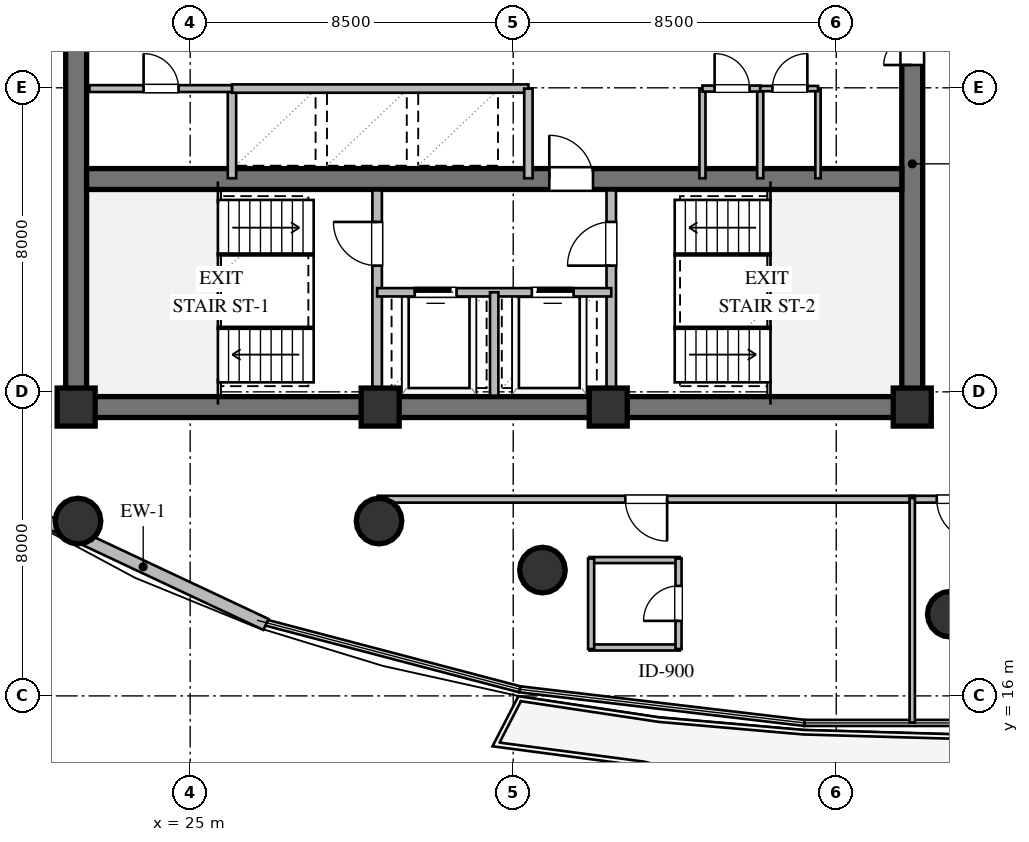
"""IFC4 building model, lengths in metres.
Left out: names, types, materials, properties, quantities, classifications, styles, units other than length and angle.
Written with IfcOpenShell. Run it as: python <this file> out.ifc"""

import sys

from ifc_helpers import new_model, si_unit, direction, frame, frame_2d, origin, origin_2d, place, context, subcontext, project, spatial, rectangle, circle, extrude, element, fill, save


model = new_model("IFC4")
c1 = context("Model", 3, precision=1e-05, world=origin(), true_north=direction((0.0, 1.0)))
c2 = subcontext(c1, "Body", "Model", "MODEL_VIEW")
j1 = project(units=[si_unit("LENGTHUNIT", "METRE"), si_unit("PLANEANGLEUNIT", "RADIAN")], contexts=[c1])
p1 = place(None, origin())
s1 = spatial("IfcSite", under=j1, at=p1, CompositionType="ELEMENT")
p2 = place(p1, origin())
s2 = spatial("IfcBuilding", under=s1, at=p2, CompositionType="ELEMENT")
p3 = place(p2, frame((0.0, 0.0, 160.2)))
s3 = spatial("IfcBuildingStorey", under=s2, at=p3, CompositionType="ELEMENT", Elevation=160.2)
p4 = place(p3, frame((21.725, 23.6, 0.0), z_axis=(0.0, 0.0, 1.0), x_axis=(1.0, 0.0, 0.0)))
e1 = element("IfcWall", 1, at=p4, inside=s3, PredefinedType="SHEAR", context=c2, shape_type="SweptSolid", body=[
    extrude(rectangle(XDim=22.55, YDim=0.55, at=frame_2d((11.275, 0.0))), origin(), (0.0, 0.0, 1.0), 3.36),
])
p5 = place(p3, frame((22.0, 23.875, 0.0), z_axis=(0.0, 0.0, 1.0), x_axis=(0.0, 1.0, 0.0)))
e2 = element("IfcWall", 2, at=p5, inside=s3, PredefinedType="SHEAR", context=c2, shape_type="SweptSolid", body=[
    extrude(rectangle(XDim=12.25, YDim=0.55, at=frame_2d((6.125, 0.0))), origin(), (0.0, 0.0, 1.0), 3.36),
])
p6 = place(p3, frame((44.0, 23.875, 0.0), z_axis=(0.0, 0.0, 1.0), x_axis=(0.0, 1.0, 0.0)))
e3 = element("IfcWall", 3, at=p6, inside=s3, PredefinedType="SHEAR", context=c2, shape_type="SweptSolid", body=[
    extrude(rectangle(XDim=12.25, YDim=0.55, at=frame_2d((6.125, 0.0))), origin(), (0.0, 0.0, 1.0), 3.36),
])
p7 = place(p6, frame((8.725, 0.0, 0.0)))
e4 = element("IfcOpeningElement", 4, at=p7, cuts=e3, PredefinedType="OPENING", context=c2, shape_type="SweptSolid", body=[
    extrude(rectangle(XDim=1.5, YDim=2.15, at=frame_2d((0.75, 1.075))), frame((0.0, 0.285, 0.0), z_axis=(0.0, -1.0, 0.0), x_axis=(1.0, 0.0, 0.0)), (0.0, 0.0, 1.0), 0.57),
])
p8 = place(p3, frame((22.275, 29.6, 0.0), z_axis=(0.0, 0.0, 1.0), x_axis=(1.0, 0.0, 0.0)))
e5 = element("IfcWall", 5, at=p8, inside=s3, PredefinedType="SHEAR", context=c2, shape_type="SweptSolid", body=[
    extrude(rectangle(XDim=21.45, YDim=0.55, at=frame_2d((10.725, 0.0))), origin(), (0.0, 0.0, 1.0), 3.36),
])
p9 = place(p8, frame((12.175, 0.0, 0.0)))
e6 = element("IfcOpeningElement", 6, at=p9, cuts=e5, PredefinedType="OPENING", context=c2, shape_type="SweptSolid", body=[
    extrude(rectangle(XDim=1.15, YDim=2.1, at=frame_2d((0.575, 1.05))), frame((0.0, 0.285, 0.0), z_axis=(0.0, -1.0, 0.0), x_axis=(1.0, 0.0, 0.0)), (0.0, 0.0, 1.0), 0.57),
])
for number, where, z_axis, x_axis in (
    (7, (22.0, 23.6, 0.0), (0.0, 0.0, 1.0), (1.0, 0.0, 0.0)),
    (8, (30.0, 23.6, 0.0), (0.0, 0.0, 1.0), (1.0, 0.0, 0.0)),
    (9, (36.0, 23.6, 0.0), (0.0, 0.0, 1.0), (1.0, 0.0, 0.0)),
    (10, (44.0, 23.6, 0.0), (0.0, 0.0, 1.0), (1.0, 0.0, 0.0)),
):
    element("IfcColumn", number, at=place(p3, frame(where, z_axis=z_axis, x_axis=x_axis)), inside=s3, PredefinedType="COLUMN", context=c2, shape_type="SweptSolid", body=[
        extrude(rectangle(XDim=1.0, YDim=1.0, at=origin_2d()), origin(), (0.0, 0.0, 1.0), 3.6),
    ])
for number, where, z_axis, x_axis in (
    (11, (22.05, 20.6, 0.0), (0.0, 0.0, 1.0), (1.0, 0.0, 0.0)),
    (12, (29.97, 20.6, 0.0), (0.0, 0.0, 1.0), (1.0, 0.0, 0.0)),
    (13, (34.27, 19.31, 0.0), (0.0, 0.0, 1.0), (1.0, 0.0, 0.0)),
    (14, (45.0, 18.15, 0.0), (0.0, 0.0, 1.0), (1.0, 0.0, 0.0)),
):
    element("IfcColumn", number, at=place(p3, frame(where, z_axis=z_axis, x_axis=x_axis)), inside=s3, PredefinedType="COLUMN", context=c2, shape_type="SweptSolid", body=[
        extrude(circle(Radius=0.6, at=origin_2d()), origin(), (0.0, 0.0, 1.0), 3.6),
    ])
p10 = place(p3, frame((26.994, 17.88, 0.0), z_axis=(0.0, 0.0, 1.0), x_axis=(-0.905106920297, 0.425184034073, 0.0)))
e15 = element("IfcWall", 15, at=p10, inside=s3, PredefinedType="STANDARD", context=c2, shape_type="SweptSolid", body=[
    extrude(rectangle(XDim=7.136, YDim=0.32, at=frame_2d((3.568, 0.0))), origin(), (0.0, 0.0, 1.0), 2.657),
])
p11 = place(p3, frame((29.92, 23.9, 0.0), z_axis=(0.0, 0.0, 1.0), x_axis=(0.0, 1.0, 0.0)))
e16 = element("IfcWall", 16, at=p11, inside=s3, PredefinedType="SOLIDWALL", context=c2, shape_type="SweptSolid", body=[
    extrude(rectangle(XDim=5.4, YDim=0.25, at=frame_2d((2.7, 0.0))), origin(), (0.0, 0.0, 1.0), 2.806),
])
p12 = place(p11, frame((3.421, 0.0, 0.0)))
e17 = element("IfcOpeningElement", 17, at=p12, cuts=e16, PredefinedType="OPENING", context=c2, shape_type="SweptSolid", body=[
    extrude(rectangle(XDim=1.15, YDim=2.1, at=frame_2d((0.575, 1.05))), frame((0.0, 0.135, 0.0), z_axis=(0.0, -1.0, 0.0), x_axis=(1.0, 0.0, 0.0)), (0.0, 0.0, 1.0), 0.27),
])
p13 = place(p3, frame((36.08, 23.9, 0.0), z_axis=(0.0, 0.0, 1.0), x_axis=(0.0, 1.0, 0.0)))
e18 = element("IfcWall", 18, at=p13, inside=s3, PredefinedType="SOLIDWALL", context=c2, shape_type="SweptSolid", body=[
    extrude(rectangle(XDim=5.4, YDim=0.25, at=frame_2d((2.7, 0.0))), origin(), (0.0, 0.0, 1.0), 3.36),
])
p14 = place(p13, frame((3.421, 0.0, 0.0)))
e19 = element("IfcOpeningElement", 19, at=p14, cuts=e18, PredefinedType="OPENING", context=c2, shape_type="SweptSolid", body=[
    extrude(rectangle(XDim=1.15, YDim=2.1, at=frame_2d((0.575, 1.05))), frame((0.0, 0.135, 0.0), z_axis=(0.0, -1.0, 0.0), x_axis=(1.0, 0.0, 0.0)), (0.0, 0.0, 1.0), 0.27),
])
p15 = place(p3, frame((29.92, 26.62, 0.0), z_axis=(0.0, 0.0, 1.0), x_axis=(1.0, 0.0, 0.0)))
e20 = element("IfcWall", 20, at=p15, inside=s3, PredefinedType="SOLIDWALL", context=c2, shape_type="SweptSolid", body=[
    extrude(rectangle(XDim=6.16, YDim=0.22, at=frame_2d((3.08, 0.0))), origin(), (0.0, 0.0, 1.0), 3.36),
])
p16 = place(p15, frame((0.99, 0.0, 0.0)))
e21 = element("IfcOpeningElement", 21, at=p16, cuts=e20, PredefinedType="OPENING", context=c2, shape_type="SweptSolid", body=[
    extrude(rectangle(XDim=1.1, YDim=2.1, at=frame_2d((0.55, 1.05))), frame((0.0, 0.12, 0.0), z_axis=(0.0, -1.0, 0.0), x_axis=(1.0, 0.0, 0.0)), (0.0, 0.0, 1.0), 0.24),
])
p17 = place(p15, frame((4.07, 0.0, 0.0)))
e22 = element("IfcOpeningElement", 22, at=p17, cuts=e20, PredefinedType="OPENING", context=c2, shape_type="SweptSolid", body=[
    extrude(rectangle(XDim=1.1, YDim=2.1, at=frame_2d((0.55, 1.05))), frame((0.0, 0.12, 0.0), z_axis=(0.0, -1.0, 0.0), x_axis=(1.0, 0.0, 0.0)), (0.0, 0.0, 1.0), 0.24),
])
p18 = place(p3, frame((33.0, 23.9, 0.0), z_axis=(0.0, 0.0, 1.0), x_axis=(0.0, 1.0, 0.0)))
e23 = element("IfcWall", 23, at=p18, inside=s3, PredefinedType="SOLIDWALL", context=c2, shape_type="SweptSolid", body=[
    extrude(rectangle(XDim=2.72, YDim=0.22, at=frame_2d((1.36, 0.0))), origin(), (0.0, 0.0, 1.0), 3.36),
])
p19 = place(p3, frame((26.1, 29.62, 0.0), z_axis=(0.0, 0.0, 1.0), x_axis=(0.0, 1.0, 0.0)))
e24 = element("IfcWall", 24, at=p19, inside=s3, PredefinedType="SOLIDWALL", context=c2, shape_type="SweptSolid", body=[
    extrude(rectangle(XDim=2.36, YDim=0.22, at=frame_2d((1.18, 0.0))), origin(), (0.0, 0.0, 1.0), 3.36),
])
p20 = place(p3, frame((26.1, 31.98, 0.0), z_axis=(0.0, 0.0, 1.0), x_axis=(1.0, 0.0, 0.0)))
e25 = element("IfcWall", 25, at=p20, inside=s3, PredefinedType="SOLIDWALL", context=c2, shape_type="SweptSolid", body=[
    extrude(rectangle(XDim=7.8, YDim=0.22, at=frame_2d((3.9, 0.0))), origin(), (0.0, 0.0, 1.0), 3.36),
])
p21 = place(p3, frame((33.9, 29.62, 0.0), z_axis=(0.0, 0.0, 1.0), x_axis=(0.0, 1.0, 0.0)))
e26 = element("IfcWall", 26, at=p21, inside=s3, PredefinedType="SOLIDWALL", context=c2, shape_type="SweptSolid", body=[
    extrude(rectangle(XDim=2.36, YDim=0.22, at=frame_2d((1.18, 0.0))), origin(), (0.0, 0.0, 1.0), 3.36),
])
p22 = place(p3, frame((22.35, 31.98, 0.0), z_axis=(0.0, 0.0, 1.0), x_axis=(1.0, 0.0, 0.0)))
e27 = element("IfcWall", 27, at=p22, inside=s3, PredefinedType="PARTITIONING", context=c2, shape_type="SweptSolid", body=[
    extrude(rectangle(XDim=3.75, YDim=0.18, at=frame_2d((1.875, 0.0))), origin(), (0.0, 0.0, 1.0), 3.36),
])
p23 = place(p22, frame((1.425, 0.0, 0.0)))
e28 = element("IfcOpeningElement", 28, at=p23, cuts=e27, PredefinedType="OPENING", context=c2, shape_type="SweptSolid", body=[
    extrude(rectangle(XDim=0.92, YDim=2.1, at=frame_2d((0.46, 1.05))), frame((0.0, 0.1, 0.0), z_axis=(0.0, -1.0, 0.0), x_axis=(1.0, 0.0, 0.0)), (0.0, 0.0, 1.0), 0.2),
])
for number, where, z_axis, x_axis in (
    (29, (38.48, 29.62, 0.0), (0.0, 0.0, 1.0), (0.0, 1.0, 0.0)),
    (30, (40.0, 29.62, 0.0), (0.0, 0.0, 1.0), (0.0, 1.0, 0.0)),
):
    element("IfcWall", number, at=place(p3, frame(where, z_axis=z_axis, x_axis=x_axis)), inside=s3, PredefinedType="PLUMBINGWALL", context=c2, shape_type="SweptSolid", body=[
        extrude(rectangle(XDim=2.36, YDim=0.16, at=frame_2d((1.18, 0.0))), origin(), (0.0, 0.0, 1.0), 3.36),
    ])
p24 = place(p3, frame((41.52, 29.62, 0.0), z_axis=(0.0, 0.0, 1.0), x_axis=(0.0, 1.0, 0.0)))
e31 = element("IfcWall", 31, at=p24, inside=s3, PredefinedType="PARTITIONING", context=c2, shape_type="SweptSolid", body=[
    extrude(rectangle(XDim=2.36, YDim=0.14, at=frame_2d((1.18, 0.0))), origin(), (0.0, 0.0, 1.0), 3.36),
])
p25 = place(p3, frame((38.48, 31.98, 0.0), z_axis=(0.0, 0.0, 1.0), x_axis=(1.0, 0.0, 0.0)))
e32 = element("IfcWall", 32, at=p25, inside=s3, PredefinedType="PLUMBINGWALL", context=c2, shape_type="SweptSolid", body=[
    extrude(rectangle(XDim=1.52, YDim=0.16, at=frame_2d((0.76, 0.0))), origin(), (0.0, 0.0, 1.0), 3.36),
])
p26 = place(p25, frame((0.32, 0.0, 0.0)))
e33 = element("IfcOpeningElement", 33, at=p26, cuts=e32, PredefinedType="OPENING", context=c2, shape_type="SweptSolid", body=[
    extrude(rectangle(XDim=0.92, YDim=2.1, at=frame_2d((0.46, 1.05))), frame((0.0, 0.09, 0.0), z_axis=(0.0, -1.0, 0.0), x_axis=(1.0, 0.0, 0.0)), (0.0, 0.0, 1.0), 0.18),
])
p27 = place(p3, frame((40.0, 31.98, 0.0), z_axis=(0.0, 0.0, 1.0), x_axis=(1.0, 0.0, 0.0)))
e34 = element("IfcWall", 34, at=p27, inside=s3, PredefinedType="PARTITIONING", context=c2, shape_type="SweptSolid", body=[
    extrude(rectangle(XDim=1.52, YDim=0.14, at=frame_2d((0.76, 0.0))), origin(), (0.0, 0.0, 1.0), 3.36),
])
p28 = place(p27, frame((0.32, 0.0, 0.0)))
e35 = element("IfcOpeningElement", 35, at=p28, cuts=e34, PredefinedType="OPENING", context=c2, shape_type="SweptSolid", body=[
    extrude(rectangle(XDim=0.92, YDim=2.1, at=frame_2d((0.46, 1.05))), frame((0.0, 0.08, 0.0), z_axis=(0.0, -1.0, 0.0), x_axis=(1.0, 0.0, 0.0)), (0.0, 0.0, 1.0), 0.16),
])
p29 = place(p3, frame((35.51, 17.274, 0.0), z_axis=(0.0, 0.0, 1.0), x_axis=(1.0, 0.0, 0.0)))
e36 = element("IfcWall", 36, at=p29, inside=s3, PredefinedType="PLUMBINGWALL", context=c2, shape_type="SweptSolid", body=[
    extrude(rectangle(XDim=2.38, YDim=0.16, at=frame_2d((1.19, 0.0))), origin(), (0.0, 0.0, 1.0), 3.36),
])
p30 = place(p3, frame((35.51, 19.574, 0.0), z_axis=(0.0, 0.0, 1.0), x_axis=(1.0, 0.0, 0.0)))
e37 = element("IfcWall", 37, at=p30, inside=s3, PredefinedType="PLUMBINGWALL", context=c2, shape_type="SweptSolid", body=[
    extrude(rectangle(XDim=2.38, YDim=0.16, at=frame_2d((1.19, 0.0))), origin(), (0.0, 0.0, 1.0), 2.657),
])
p31 = place(p3, frame((35.55, 17.234, 0.0), z_axis=(0.0, 0.0, 1.0), x_axis=(0.0, 1.0, 0.0)))
e38 = element("IfcWall", 38, at=p31, inside=s3, PredefinedType="PLUMBINGWALL", context=c2, shape_type="SweptSolid", body=[
    extrude(rectangle(XDim=2.38, YDim=0.16, at=frame_2d((1.19, 0.0))), origin(), (0.0, 0.0, 1.0), 3.36),
])
p32 = place(p3, frame((37.85, 17.234, 0.0), z_axis=(0.0, 0.0, 1.0), x_axis=(0.0, 1.0, 0.0)))
e39 = element("IfcWall", 39, at=p32, inside=s3, PredefinedType="PLUMBINGWALL", context=c2, shape_type="SweptSolid", body=[
    extrude(rectangle(XDim=2.38, YDim=0.16, at=frame_2d((1.19, 0.0))), origin(), (0.0, 0.0, 1.0), 3.36),
])
p33 = place(p32, frame((0.74, 0.0, 0.0)))
e40 = element("IfcOpeningElement", 40, at=p33, cuts=e39, PredefinedType="OPENING", context=c2, shape_type="SweptSolid", body=[
    extrude(rectangle(XDim=0.92, YDim=2.1, at=frame_2d((0.46, 1.05))), frame((0.0, 0.09, 0.0), z_axis=(0.0, -1.0, 0.0), x_axis=(1.0, 0.0, 0.0)), (0.0, 0.0, 1.0), 0.18),
])
p34 = place(p3, frame((44.065, 21.175, 0.0), z_axis=(0.0, 0.0, 1.0), x_axis=(-1.0, 0.0, 0.0)))
e41 = element("IfcWall", 41, at=p34, inside=s3, PredefinedType="PARTITIONING", context=c2, shape_type="SweptSolid", body=[
    extrude(rectangle(XDim=14.13, YDim=0.18, at=frame_2d((7.065, 0.0))), origin(), (0.0, 0.0, 1.0), 2.657),
])
p35 = place(p34, frame((6.515, 0.0, 0.0)))
e42 = element("IfcOpeningElement", 42, at=p35, cuts=e41, PredefinedType="OPENING", context=c2, shape_type="SweptSolid", body=[
    extrude(rectangle(XDim=1.1, YDim=2.1, at=frame_2d((0.55, 1.05))), frame((0.0, 0.1, 0.0), z_axis=(0.0, -1.0, 0.0), x_axis=(1.0, 0.0, 0.0)), (0.0, 0.0, 1.0), 0.2),
])
p36 = place(p3, frame((46.455, 21.175, 0.0), z_axis=(0.0, 0.0, 1.0), x_axis=(-1.0, 0.0, 0.0)))
e43 = element("IfcWall", 43, at=p36, inside=s3, PredefinedType="PARTITIONING", context=c2, shape_type="SweptSolid", body=[
    extrude(rectangle(XDim=2.52, YDim=0.18, at=frame_2d((1.26, 0.0))), origin(), (0.0, 0.0, 1.0), 2.996),
])
p37 = place(p36, frame((0.71, 0.0, 0.0)))
e44 = element("IfcOpeningElement", 44, at=p37, cuts=e43, PredefinedType="OPENING", context=c2, shape_type="SweptSolid", body=[
    extrude(rectangle(XDim=1.1, YDim=2.1, at=frame_2d((0.55, 1.05))), frame((0.0, 0.1, 0.0), z_axis=(0.0, -1.0, 0.0), x_axis=(1.0, 0.0, 0.0)), (0.0, 0.0, 1.0), 0.2),
])
p38 = place(p3, frame((44.0, 21.205, 0.0), z_axis=(0.0, 0.0, 1.0), x_axis=(0.0, -1.0, 0.0)))
e45 = element("IfcWall", 45, at=p38, inside=s3, PredefinedType="PARTITIONING", context=c2, shape_type="SweptSolid", body=[
    extrude(rectangle(XDim=5.906, YDim=0.14, at=frame_2d((2.953, 0.0))), origin(), (0.0, 0.0, 1.0), 2.806),
])
p39 = place(p12, origin())
e46 = element("IfcDoor", 46, at=p39, inside=s3, OperationType="SINGLE_SWING_RIGHT", PredefinedType="DOOR", context=c2, shape_type="SweptSolid", body=[
    extrude(rectangle(XDim=1.15, YDim=2.1, at=frame_2d((0.575, 1.05))), frame((0.0, 0.025, 0.0), z_axis=(0.0, -1.0, 0.0), x_axis=(1.0, 0.0, 0.0)), (0.0, 0.0, 1.0), 0.05),
])
fill(e17, e46)
p40 = place(p14, origin())
e47 = element("IfcDoor", 47, at=p40, inside=s3, OperationType="SINGLE_SWING_LEFT", PredefinedType="DOOR", context=c2, shape_type="SweptSolid", body=[
    extrude(rectangle(XDim=1.15, YDim=2.1, at=frame_2d((0.575, 1.05))), frame((0.0, 0.025, 0.0), z_axis=(0.0, -1.0, 0.0), x_axis=(1.0, 0.0, 0.0)), (0.0, 0.0, 1.0), 0.05),
])
fill(e19, e47)
p41 = place(p16, origin())
e48 = element("IfcDoor", 48, at=p41, inside=s3, OperationType="SLIDING_TO_LEFT", PredefinedType="DOOR", context=c2, shape_type="SweptSolid", body=[
    extrude(rectangle(XDim=1.1, YDim=2.1, at=frame_2d((0.55, 1.05))), frame((0.0, 0.025, 0.0), z_axis=(0.0, -1.0, 0.0), x_axis=(1.0, 0.0, 0.0)), (0.0, 0.0, 1.0), 0.05),
])
fill(e21, e48)
p42 = place(p17, origin())
e49 = element("IfcDoor", 49, at=p42, inside=s3, OperationType="SLIDING_TO_RIGHT", PredefinedType="DOOR", context=c2, shape_type="SweptSolid", body=[
    extrude(rectangle(XDim=1.1, YDim=2.1, at=frame_2d((0.55, 1.05))), frame((0.0, 0.025, 0.0), z_axis=(0.0, -1.0, 0.0), x_axis=(1.0, 0.0, 0.0)), (0.0, 0.0, 1.0), 0.05),
])
fill(e22, e49)
p43 = place(p9, origin())
e50 = element("IfcDoor", 50, at=p43, inside=s3, OperationType="SINGLE_SWING_LEFT", PredefinedType="DOOR", context=c2, shape_type="SweptSolid", body=[
    extrude(rectangle(XDim=1.15, YDim=2.1, at=frame_2d((0.575, 1.05))), frame((0.0, 0.025, 0.0), z_axis=(0.0, -1.0, 0.0), x_axis=(1.0, 0.0, 0.0)), (0.0, 0.0, 1.0), 0.05),
])
fill(e6, e50)
p44 = place(p7, origin())
e51 = element("IfcDoor", 51, at=p44, inside=s3, OperationType="DOUBLE_DOOR_SINGLE_SWING", PredefinedType="DOOR", context=c2, shape_type="SweptSolid", body=[
    extrude(rectangle(XDim=1.5, YDim=2.15, at=frame_2d((0.75, 1.075))), frame((0.0, 0.025, 0.0), z_axis=(0.0, -1.0, 0.0), x_axis=(1.0, 0.0, 0.0)), (0.0, 0.0, 1.0), 0.05),
])
fill(e4, e51)
p45 = place(p23, origin())
e52 = element("IfcDoor", 52, at=p45, inside=s3, OperationType="SINGLE_SWING_LEFT", PredefinedType="DOOR", context=c2, shape_type="SweptSolid", body=[
    extrude(rectangle(XDim=0.92, YDim=2.1, at=frame_2d((0.46, 1.05))), frame((0.0, 0.025, 0.0), z_axis=(0.0, -1.0, 0.0), x_axis=(1.0, 0.0, 0.0)), (0.0, 0.0, 1.0), 0.05),
])
fill(e28, e52)
p46 = place(p26, origin())
e53 = element("IfcDoor", 53, at=p46, inside=s3, OperationType="SINGLE_SWING_LEFT", PredefinedType="DOOR", context=c2, shape_type="SweptSolid", body=[
    extrude(rectangle(XDim=0.92, YDim=2.1, at=frame_2d((0.46, 1.05))), frame((0.0, 0.025, 0.0), z_axis=(0.0, -1.0, 0.0), x_axis=(1.0, 0.0, 0.0)), (0.0, 0.0, 1.0), 0.05),
])
fill(e33, e53)
p47 = place(p28, origin())
e54 = element("IfcDoor", 54, at=p47, inside=s3, OperationType="SINGLE_SWING_RIGHT", PredefinedType="DOOR", context=c2, shape_type="SweptSolid", body=[
    extrude(rectangle(XDim=0.92, YDim=2.1, at=frame_2d((0.46, 1.05))), frame((0.0, 0.025, 0.0), z_axis=(0.0, -1.0, 0.0), x_axis=(1.0, 0.0, 0.0)), (0.0, 0.0, 1.0), 0.05),
])
fill(e35, e54)
p48 = place(p33, origin())
e55 = element("IfcDoor", 55, at=p48, inside=s3, OperationType="SINGLE_SWING_LEFT", PredefinedType="DOOR", context=c2, shape_type="SweptSolid", body=[
    extrude(rectangle(XDim=0.92, YDim=2.1, at=frame_2d((0.46, 1.05))), frame((0.0, 0.025, 0.0), z_axis=(0.0, -1.0, 0.0), x_axis=(1.0, 0.0, 0.0)), (0.0, 0.0, 1.0), 0.05),
])
fill(e40, e55)
p49 = place(p35, origin())
e56 = element("IfcDoor", 56, at=p49, inside=s3, OperationType="SINGLE_SWING_LEFT", PredefinedType="DOOR", context=c2, shape_type="SweptSolid", body=[
    extrude(rectangle(XDim=1.1, YDim=2.1, at=frame_2d((0.55, 1.05))), frame((0.0, 0.025, 0.0), z_axis=(0.0, -1.0, 0.0), x_axis=(1.0, 0.0, 0.0)), (0.0, 0.0, 1.0), 0.05),
])
fill(e42, e56)
p50 = place(p37, origin())
e57 = element("IfcDoor", 57, at=p50, inside=s3, OperationType="SINGLE_SWING_LEFT", PredefinedType="DOOR", context=c2, shape_type="SweptSolid", body=[
    extrude(rectangle(XDim=1.1, YDim=2.1, at=frame_2d((0.55, 1.05))), frame((0.0, 0.025, 0.0), z_axis=(0.0, -1.0, 0.0), x_axis=(1.0, 0.0, 0.0)), (0.0, 0.0, 1.0), 0.05),
])
fill(e44, e57)
save(model, sys.argv[1])
